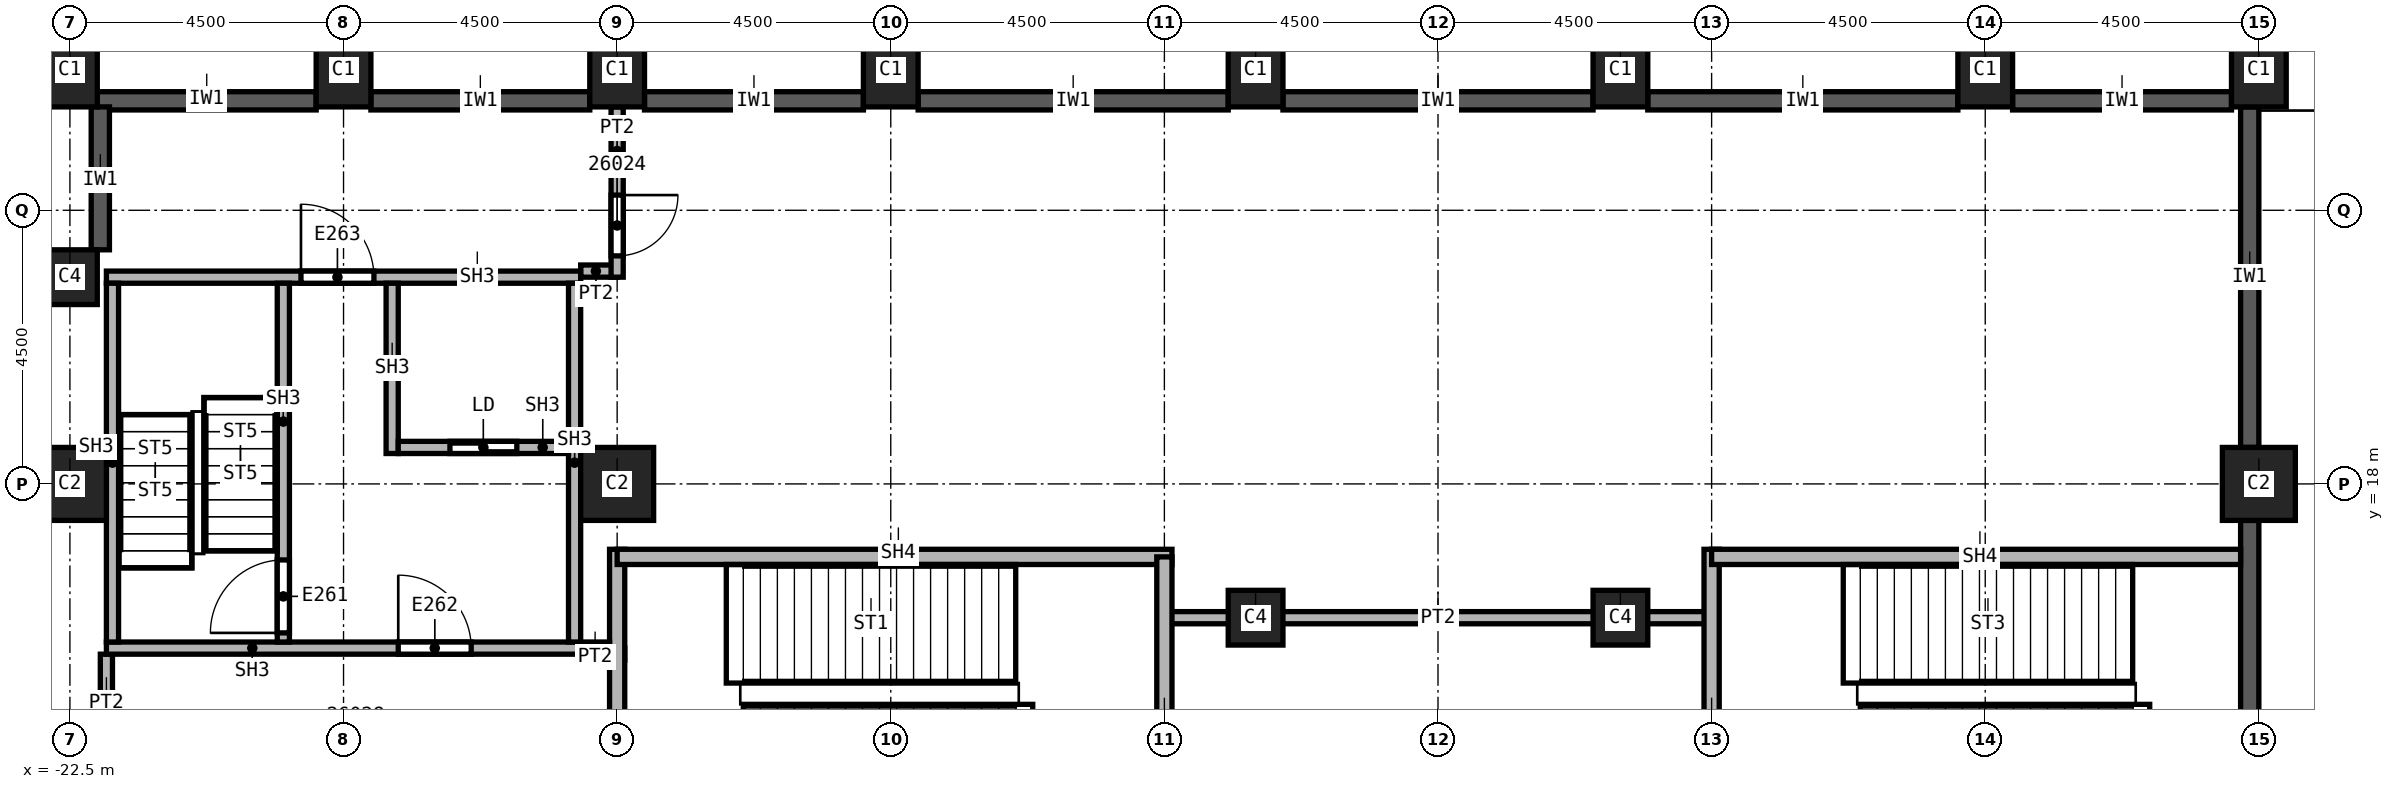
"""IFC4 building model, lengths in metres.
Left out: names, types, materials, properties, quantities, classifications, styles, units other than length and angle.
Written with IfcOpenShell. Run it as: python <this file> out.ifc"""

import sys

from ifc_helpers import new_model, si_unit, direction, frame, frame_2d, origin, origin_2d, place, context, subcontext, project, spatial, rectangle, extrude, element, fill, save


model = new_model("IFC4")
c1 = context("Model", 3, precision=1e-05, world=origin(), true_north=direction((0.0, 1.0)))
c2 = subcontext(c1, "Body", "Model", "MODEL_VIEW")
j1 = project(units=[si_unit("LENGTHUNIT", "METRE"), si_unit("PLANEANGLEUNIT", "RADIAN")], contexts=[c1])
p1 = place(None, origin())
s1 = spatial("IfcSite", under=j1, at=p1, CompositionType="ELEMENT")
p2 = place(p1, origin())
s2 = spatial("IfcBuilding", under=s1, at=p2, CompositionType="ELEMENT")
p3 = place(p2, frame((0.0, 0.0, 120.0)))
s3 = spatial("IfcBuildingStorey", under=s2, at=p3, CompositionType="ELEMENT", Elevation=120.0)
for number, where, z_axis, x_axis in (
    (1, (13.5, 18.0, 0.0), (0.0, 0.0, 1.0), (1.0, 0.0, 0.0)),
    (2, (-13.5, 18.0, 0.0), (0.0, 0.0, 1.0), (1.0, 0.0, 0.0)),
    (3, (-22.5, 18.0, 0.0), (0.0, 0.0, 1.0), (1.0, 0.0, 0.0)),
):
    element("IfcColumn", number, at=place(p3, frame(where, z_axis=z_axis, x_axis=x_axis)), inside=s3, PredefinedType="COLUMN", context=c2, shape_type="SweptSolid", body=[
        extrude(rectangle(XDim=1.2, YDim=1.2, at=origin_2d()), origin(), (0.0, 0.0, 1.0), 5.7),
    ])
for number, where, z_axis, x_axis in (
    (4, (3.0, 24.8, 0.0), (0.0, -0.206, 0.979), (1.0, 0.0, 0.0)),
    (5, (9.0, 24.8, 0.0), (0.0, -0.206, 0.979), (1.0, 0.0, 0.0)),
    (6, (13.5, 24.8, 0.0), (0.0, -0.206, 0.979), (1.0, 0.0, 0.0)),
    (7, (-3.0, 24.8, 0.0), (0.0, -0.206, 0.979), (1.0, 0.0, 0.0)),
    (8, (-9.0, 24.8, 0.0), (0.0, -0.206, 0.979), (1.0, 0.0, 0.0)),
    (9, (-13.5, 24.8, 0.0), (0.0, -0.206, 0.979), (1.0, 0.0, 0.0)),
    (10, (-18.0, 24.8, 0.0), (0.0, -0.206, 0.979), (1.0, 0.0, 0.0)),
    (11, (-22.5, 24.8, 0.0), (0.0, -0.206, 0.979), (1.0, 0.0, 0.0)),
):
    element("IfcColumn", number, at=place(p3, frame(where, z_axis=z_axis, x_axis=x_axis)), inside=s3, PredefinedType="COLUMN", context=c2, shape_type="SweptSolid", body=[
        extrude(rectangle(XDim=0.9, YDim=1.2, at=origin_2d()), origin(), (0.0, 0.0, 1.0), 5.825),
    ])
for number, where, z_axis, x_axis in (
    (12, (3.0, 15.8, 0.0), (0.0, -0.206, 0.979), (1.0, 0.0, 0.0)),
    (13, (-3.0, 15.8, 0.0), (0.0, -0.206, 0.979), (1.0, 0.0, 0.0)),
):
    element("IfcColumn", number, at=place(p3, frame(where, z_axis=z_axis, x_axis=x_axis)), inside=s3, PredefinedType="COLUMN", context=c2, shape_type="SweptSolid", body=[
        extrude(rectangle(XDim=0.9, YDim=0.9, at=origin_2d()), origin(), (0.0, 0.0, 1.0), 5.825),
    ])
p4 = place(p3, frame((-22.5, 21.4, 0.0), z_axis=(0.0, -0.104660393429, 0.994508020102), x_axis=(1.0, 0.0, 0.0)))
e14 = element("IfcColumn", 14, at=p4, inside=s3, PredefinedType="COLUMN", context=c2, shape_type="SweptSolid", body=[
    extrude(rectangle(XDim=0.9, YDim=0.9, at=origin_2d()), origin(), (0.0, 0.0, 1.0), 5.731),
])
p5 = place(p3, frame((13.05, 24.3, 0.0), z_axis=(0.0, 0.0, 1.0), x_axis=(-1.0, 0.0, 0.0)))
e15 = element("IfcWall", 15, at=p5, inside=s3, PredefinedType="SOLIDWALL", context=c2, shape_type="SweptSolid", body=[
    extrude(rectangle(XDim=3.6, YDim=0.3, at=frame_2d((1.8, 0.0))), origin(), (0.0, 0.0, 1.0), 5.1),
])
for number, where, z_axis, x_axis in (
    (16, (8.55, 24.3, 0.0), (0.0, 0.0, 1.0), (-1.0, 0.0, 0.0)),
    (17, (2.55, 24.3, 0.0), (0.0, 0.0, 1.0), (-1.0, 0.0, 0.0)),
    (18, (-3.45, 24.3, 0.0), (0.0, 0.0, 1.0), (-1.0, 0.0, 0.0)),
):
    element("IfcWall", number, at=place(p3, frame(where, z_axis=z_axis, x_axis=x_axis)), inside=s3, PredefinedType="SOLIDWALL", context=c2, shape_type="SweptSolid", body=[
        extrude(rectangle(XDim=5.1, YDim=0.3, at=frame_2d((2.55, 0.0))), origin(), (0.0, 0.0, 1.0), 5.1),
    ])
for number, where, z_axis, x_axis in (
    (19, (-9.45, 24.3, 0.0), (0.0, 0.0, 1.0), (-1.0, 0.0, 0.0)),
    (20, (-13.95, 24.3, 0.0), (0.0, 0.0, 1.0), (-1.0, 0.0, 0.0)),
    (21, (-18.45, 24.3, 0.0), (0.0, 0.0, 1.0), (-1.0, 0.0, 0.0)),
):
    element("IfcWall", number, at=place(p3, frame(where, z_axis=z_axis, x_axis=x_axis)), inside=s3, PredefinedType="SOLIDWALL", context=c2, shape_type="SweptSolid", body=[
        extrude(rectangle(XDim=3.6, YDim=0.3, at=frame_2d((1.8, 0.0))), origin(), (0.0, 0.0, 1.0), 5.1),
    ])
p6 = place(p3, frame((-22.0, 24.2, 0.0), z_axis=(0.0, 0.0, 1.0), x_axis=(0.0, -1.0, 0.0)))
e22 = element("IfcWall", 22, at=p6, inside=s3, PredefinedType="SOLIDWALL", context=c2, shape_type="SweptSolid", body=[
    extrude(rectangle(XDim=2.35, YDim=0.3, at=frame_2d((1.175, 0.0))), origin(), (0.0, 0.0, 1.0), 5.1),
])
p7 = place(p3, frame((13.35, 17.4, 0.0), z_axis=(0.0, 0.0, 1.0), x_axis=(0.0, -1.0, 0.0)))
e23 = element("IfcWall", 23, at=p7, inside=s3, PredefinedType="SOLIDWALL", context=c2, shape_type="SweptSolid", body=[
    extrude(rectangle(XDim=8.35, YDim=0.3, at=frame_2d((4.175, 0.0))), origin(), (0.0, 0.0, 1.0), 5.1),
])
p8 = place(p7, frame((3.35, 0.0, 0.0)))
e24 = element("IfcOpeningElement", 24, at=p8, cuts=e23, PredefinedType="OPENING", context=c2, shape_type="SweptSolid", body=[
    extrude(rectangle(XDim=1.2, YDim=2.4, at=frame_2d((0.6, 1.2))), frame((0.0, 0.15, 0.0), z_axis=(0.0, -1.0, 0.0), x_axis=(1.0, 0.0, 0.0)), (0.0, 0.0, 1.0), 0.3),
])
p9 = place(p3, frame((13.35, 18.6, 0.0), z_axis=(0.0, 0.0, 1.0), x_axis=(0.0, 1.0, 0.0)))
e25 = element("IfcWall", 25, at=p9, inside=s3, PredefinedType="SOLIDWALL", context=c2, shape_type="SweptSolid", body=[
    extrude(rectangle(XDim=5.6, YDim=0.3, at=frame_2d((2.8, 0.0))), origin(), (0.0, 0.0, 1.0), 5.1),
])
p10 = place(p3, frame((-21.9, 13.5, 0.0), z_axis=(0.0, 0.0, 1.0), x_axis=(0.0, 1.0, 0.0)))
e26 = element("IfcWall", 26, at=p10, inside=s3, PredefinedType="PARTITIONING", context=c2, shape_type="SweptSolid", body=[
    extrude(rectangle(XDim=1.7, YDim=0.2, at=frame_2d((0.85, 0.0))), origin(), (0.0, 0.0, 1.0), 5.7),
])
p11 = place(p3, frame((-14.1, 15.2, 0.0), z_axis=(0.0, 0.0, 1.0), x_axis=(1.0, 0.0, 0.0)))
e27 = element("IfcWall", 27, at=p11, inside=s3, PredefinedType="PARTITIONING", context=c2, shape_type="SweptSolid", body=[
    extrude(rectangle(XDim=0.725, YDim=0.2, at=frame_2d((0.363, 0.0))), origin(), (0.0, 0.0, 1.0), 5.7),
])
p12 = place(p3, frame((-13.5, 21.5, 0.0), z_axis=(0.0, 0.0, 1.0), x_axis=(-1.0, 0.0, 0.0)))
e28 = element("IfcWall", 28, at=p12, inside=s3, PredefinedType="PARTITIONING", context=c2, shape_type="SweptSolid", body=[
    extrude(rectangle(XDim=0.6, YDim=0.2, at=frame_2d((0.3, 0.0))), origin(), (0.0, 0.0, 1.0), 5.7),
])
p13 = place(p3, frame((-13.5, 24.2, 0.0), z_axis=(0.0, 0.0, 1.0), x_axis=(0.0, -1.0, 0.0)))
e29 = element("IfcWall", 29, at=p13, inside=s3, PredefinedType="PARTITIONING", context=c2, shape_type="SweptSolid", body=[
    extrude(rectangle(XDim=2.8, YDim=0.2, at=frame_2d((1.4, 0.0))), origin(), (0.0, 0.0, 1.0), 5.7),
])
p14 = place(p13, frame((1.45, 0.0, 0.0)))
e30 = element("IfcOpeningElement", 30, at=p14, cuts=e29, PredefinedType="OPENING", context=c2, shape_type="SweptSolid", body=[
    extrude(rectangle(XDim=1.0, YDim=2.1, at=frame_2d((0.5, 1.05))), frame((0.0, 0.1, 0.0), z_axis=(0.0, -1.0, 0.0), x_axis=(1.0, 0.0, 0.0)), (0.0, 0.0, 1.0), 0.2),
])
p15 = place(p3, frame((-4.5, 15.8, 0.0), z_axis=(0.0, 0.0, 1.0), x_axis=(1.0, 0.0, 0.0)))
e31 = element("IfcWall", 31, at=p15, inside=s3, PredefinedType="PARTITIONING", context=c2, shape_type="SweptSolid", body=[
    extrude(rectangle(XDim=9.0, YDim=0.2, at=frame_2d((4.5, 0.0))), origin(), (0.0, 0.0, 1.0), 5.7),
])
p16 = place(p3, frame((-13.5, 12.175, 0.0), z_axis=(0.0, 0.0, 1.0), x_axis=(0.0, 1.0, 0.0)))
e32 = element("IfcWall", 32, at=p16, inside=s3, PredefinedType="SOLIDWALL", context=c2, shape_type="SweptSolid", body=[
    extrude(rectangle(XDim=4.75, YDim=0.25, at=frame_2d((2.375, 0.0))), origin(), (0.0, 0.0, 1.0), 5.7),
])
p17 = place(p3, frame((-13.5, 16.8, 0.0), z_axis=(0.0, 0.0, 1.0), x_axis=(1.0, 0.0, 0.0)))
e33 = element("IfcWall", 33, at=p17, inside=s3, PredefinedType="SOLIDWALL", context=c2, shape_type="SweptSolid", body=[
    extrude(rectangle(XDim=9.125, YDim=0.25, at=frame_2d((4.562, 0.0))), origin(), (0.0, 0.0, 1.0), 5.7),
])
p18 = place(p3, frame((-4.5, 16.8, 0.0), z_axis=(0.0, 0.0, 1.0), x_axis=(0.0, -1.0, 0.0)))
e34 = element("IfcWall", 34, at=p18, inside=s3, PredefinedType="SOLIDWALL", context=c2, shape_type="SweptSolid", body=[
    extrude(rectangle(XDim=4.5, YDim=0.25, at=frame_2d((2.25, 0.0))), origin(), (0.0, 0.0, 1.0), 5.7),
])
p19 = place(p3, frame((4.5, 12.3, 0.0), z_axis=(0.0, 0.0, 1.0), x_axis=(0.0, 1.0, 0.0)))
e35 = element("IfcWall", 35, at=p19, inside=s3, PredefinedType="SOLIDWALL", context=c2, shape_type="SweptSolid", body=[
    extrude(rectangle(XDim=4.625, YDim=0.25, at=frame_2d((2.312, 0.0))), origin(), (0.0, 0.0, 1.0), 5.7),
])
p20 = place(p3, frame((4.5, 16.8, 0.0), z_axis=(0.0, 0.0, 1.0), x_axis=(1.0, 0.0, 0.0)))
e36 = element("IfcWall", 36, at=p20, inside=s3, PredefinedType="SOLIDWALL", context=c2, shape_type="SweptSolid", body=[
    extrude(rectangle(XDim=8.7, YDim=0.25, at=frame_2d((4.35, 0.0))), origin(), (0.0, 0.0, 1.0), 5.7),
])
p21 = place(p3, frame((-21.9, 15.3, 0.0), z_axis=(0.0, 0.0, 1.0), x_axis=(1.0, 0.0, 0.0)))
e37 = element("IfcWall", 37, at=p21, inside=s3, PredefinedType="SOLIDWALL", context=c2, shape_type="SweptSolid", body=[
    extrude(rectangle(XDim=8.275, YDim=0.2, at=frame_2d((4.137, 0.0))), origin(), (0.0, 0.0, 1.0), 5.7),
])
p22 = place(p21, frame((4.8, 0.0, 0.0)))
e38 = element("IfcOpeningElement", 38, at=p22, cuts=e37, PredefinedType="OPENING", context=c2, shape_type="SweptSolid", body=[
    extrude(rectangle(XDim=1.2, YDim=2.1, at=frame_2d((0.6, 1.05))), frame((0.0, 0.1, 0.0), z_axis=(0.0, -1.0, 0.0), x_axis=(1.0, 0.0, 0.0)), (0.0, 0.0, 1.0), 0.2),
])
p23 = place(p3, frame((-21.9, 21.4, 0.0), z_axis=(0.0, 0.0, 1.0), x_axis=(1.0, 0.0, 0.0)))
e39 = element("IfcWall", 39, at=p23, inside=s3, PredefinedType="SOLIDWALL", context=c2, shape_type="SweptSolid", body=[
    extrude(rectangle(XDim=7.8, YDim=0.2, at=frame_2d((3.9, 0.0))), origin(), (0.0, 0.0, 1.0), 5.7),
])
p24 = place(p23, frame((3.2, 0.0, 0.0)))
e40 = element("IfcOpeningElement", 40, at=p24, cuts=e39, PredefinedType="OPENING", context=c2, shape_type="SweptSolid", body=[
    extrude(rectangle(XDim=1.2, YDim=2.1, at=frame_2d((0.6, 1.05))), frame((0.0, 0.1, 0.0), z_axis=(0.0, -1.0, 0.0), x_axis=(1.0, 0.0, 0.0)), (0.0, 0.0, 1.0), 0.2),
])
for number, where, z_axis, x_axis in (
    (41, (-21.8, 15.4, 0.0), (0.0, 0.0, 1.0), (0.0, 1.0, 0.0)),
    (42, (-14.2, 15.4, 0.0), (0.0, 0.0, 1.0), (0.0, 1.0, 0.0)),
):
    element("IfcWall", number, at=place(p3, frame(where, z_axis=z_axis, x_axis=x_axis)), inside=s3, PredefinedType="SOLIDWALL", context=c2, shape_type="SweptSolid", body=[
        extrude(rectangle(XDim=5.9, YDim=0.2, at=frame_2d((2.95, 0.0))), origin(), (0.0, 0.0, 1.0), 5.7),
    ])
p25 = place(p3, frame((-18.99, 15.4, 0.0), z_axis=(0.0, 0.0, 1.0), x_axis=(0.0, 1.0, 0.0)))
e43 = element("IfcWall", 43, at=p25, inside=s3, PredefinedType="SOLIDWALL", context=c2, shape_type="SweptSolid", body=[
    extrude(rectangle(XDim=5.9, YDim=0.2, at=frame_2d((2.95, 0.0))), origin(), (0.0, 0.0, 1.0), 5.7),
])
p26 = place(p25, frame((0.15, 0.0, 0.0)))
e44 = element("IfcOpeningElement", 44, at=p26, cuts=e43, PredefinedType="OPENING", context=c2, shape_type="SweptSolid", body=[
    extrude(rectangle(XDim=1.2, YDim=2.1, at=frame_2d((0.6, 1.05))), frame((0.0, 0.1, 0.0), z_axis=(0.0, -1.0, 0.0), x_axis=(1.0, 0.0, 0.0)), (0.0, 0.0, 1.0), 0.2),
])
p27 = place(p3, frame((-17.2, 18.5, 0.0), z_axis=(0.0, 0.0, 1.0), x_axis=(0.0, 1.0, 0.0)))
e45 = element("IfcWall", 45, at=p27, inside=s3, PredefinedType="SOLIDWALL", context=c2, shape_type="SweptSolid", body=[
    extrude(rectangle(XDim=2.8, YDim=0.2, at=frame_2d((1.4, 0.0))), origin(), (0.0, 0.0, 1.0), 5.7),
])
p28 = place(p3, frame((-17.1, 18.6, 0.0), z_axis=(0.0, 0.0, 1.0), x_axis=(1.0, 0.0, 0.0)))
e46 = element("IfcWall", 46, at=p28, inside=s3, PredefinedType="SOLIDWALL", context=c2, shape_type="SweptSolid", body=[
    extrude(rectangle(XDim=2.8, YDim=0.2, at=frame_2d((1.4, 0.0))), origin(), (0.0, 0.0, 1.0), 5.7),
])
p29 = place(p28, frame((0.85, 0.0, 0.0)))
e47 = element("IfcOpeningElement", 47, at=p29, cuts=e46, PredefinedType="OPENING", context=c2, shape_type="SweptSolid", body=[
    extrude(rectangle(XDim=1.1, YDim=2.1, at=frame_2d((0.55, 1.05))), frame((0.0, 0.1, 0.0), z_axis=(0.0, -1.0, 0.0), x_axis=(1.0, 0.0, 0.0)), (0.0, 0.0, 1.0), 0.2),
])
p30 = place(p14, origin())
e48 = element("IfcDoor", 48, at=p30, inside=s3, OperationType="SINGLE_SWING_LEFT", PredefinedType="DOOR", context=c2, shape_type="SweptSolid", body=[
    extrude(rectangle(XDim=1.0, YDim=2.1, at=frame_2d((0.5, 1.05))), frame((0.0, 0.025, 0.0), z_axis=(0.0, -1.0, 0.0), x_axis=(1.0, 0.0, 0.0)), (0.0, 0.0, 1.0), 0.05),
])
fill(e30, e48)
p31 = place(p26, origin())
e49 = element("IfcDoor", 49, at=p31, inside=s3, OperationType="SINGLE_SWING_LEFT", PredefinedType="DOOR", context=c2, shape_type="SweptSolid", body=[
    extrude(rectangle(XDim=1.2, YDim=2.1, at=frame_2d((0.6, 1.05))), frame((0.0, 0.025, 0.0), z_axis=(0.0, -1.0, 0.0), x_axis=(1.0, 0.0, 0.0)), (0.0, 0.0, 1.0), 0.05),
])
fill(e44, e49)
p32 = place(p29, origin())
e50 = element("IfcDoor", 50, at=p32, inside=s3, OperationType="SLIDING_TO_LEFT", PredefinedType="DOOR", context=c2, shape_type="SweptSolid", body=[
    extrude(rectangle(XDim=1.1, YDim=2.1, at=frame_2d((0.55, 1.05))), frame((0.0, 0.025, 0.0), z_axis=(0.0, -1.0, 0.0), x_axis=(1.0, 0.0, 0.0)), (0.0, 0.0, 1.0), 0.05),
])
fill(e47, e50)
p33 = place(p22, origin())
e51 = element("IfcDoor", 51, at=p33, inside=s3, OperationType="SINGLE_SWING_RIGHT", PredefinedType="DOOR", context=c2, shape_type="SweptSolid", body=[
    extrude(rectangle(XDim=1.2, YDim=2.1, at=frame_2d((0.6, 1.05))), frame((0.0, 0.025, 0.0), z_axis=(0.0, -1.0, 0.0), x_axis=(1.0, 0.0, 0.0)), (0.0, 0.0, 1.0), 0.05),
])
fill(e38, e51)
p34 = place(p24, origin())
e52 = element("IfcDoor", 52, at=p34, inside=s3, OperationType="SINGLE_SWING_LEFT", PredefinedType="DOOR", context=c2, shape_type="SweptSolid", body=[
    extrude(rectangle(XDim=1.2, YDim=2.1, at=frame_2d((0.6, 1.05))), frame((0.0, 0.025, 0.0), z_axis=(0.0, -1.0, 0.0), x_axis=(1.0, 0.0, 0.0)), (0.0, 0.0, 1.0), 0.05),
])
fill(e40, e52)
save(model, sys.argv[1])
